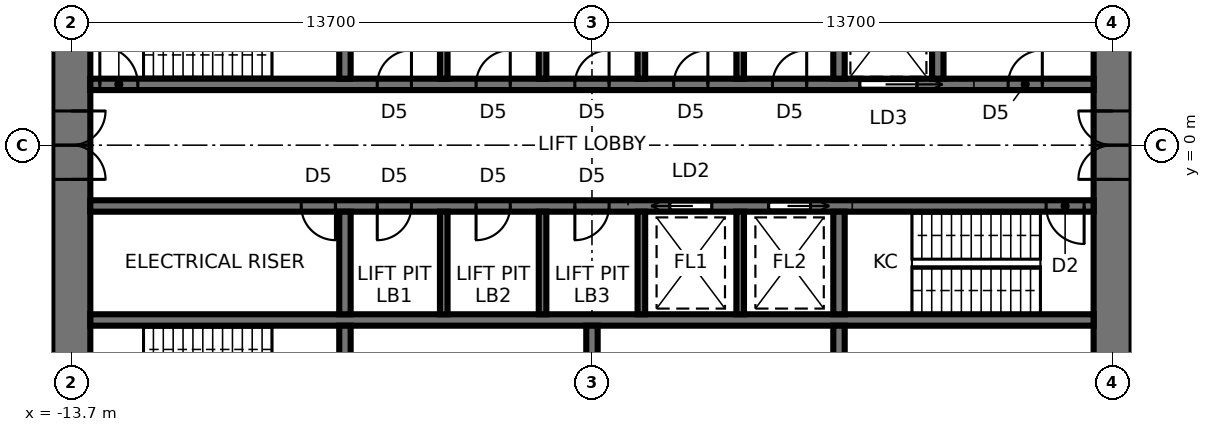
"""IFC4 building model, lengths in metres.
Left out: names, types, materials, properties, quantities, classifications, styles, units other than length and angle.
Written with IfcOpenShell. Run it as: python <this file> out.ifc"""

import sys

from ifc_helpers import new_model, si_unit, direction, frame, frame_2d, origin, place, context, subcontext, project, spatial, rectangle, extrude, element, fill, save


model = new_model("IFC4")
c1 = context("Model", 3, precision=1e-05, world=origin(), true_north=direction((0.0, 1.0)))
c2 = subcontext(c1, "Body", "Model", "MODEL_VIEW")
j1 = project(units=[si_unit("LENGTHUNIT", "METRE"), si_unit("PLANEANGLEUNIT", "RADIAN")], contexts=[c1])
p1 = place(None, origin())
s1 = spatial("IfcSite", under=j1, at=p1, CompositionType="ELEMENT")
p2 = place(p1, origin())
s2 = spatial("IfcBuilding", under=s1, at=p2, CompositionType="ELEMENT")
p3 = place(p2, frame((0.0, 0.0, -5.0)))
s3 = spatial("IfcBuildingStorey", under=s2, at=p3, CompositionType="ELEMENT", Elevation=-5.0)
p4 = place(p3, frame((13.7, -9.5, -0.15), z_axis=(0.0, 0.0, 1.0), x_axis=(0.0, 1.0, 0.0)))
e1 = element("IfcWall", 1, at=p4, inside=s3, PredefinedType="SHEAR", context=c2, shape_type="SweptSolid", body=[
    extrude(rectangle(XDim=19.0, YDim=1.0, at=frame_2d((9.5, 0.0))), origin(), (0.0, 0.0, 1.0), 5.15),
])
p5 = place(p4, frame((8.6, 0.0, 0.15)))
e2 = element("IfcOpeningElement", 2, at=p5, cuts=e1, PredefinedType="OPENING", context=c2, shape_type="SweptSolid", body=[
    extrude(rectangle(XDim=1.8, YDim=2.4, at=frame_2d((0.9, 1.2))), frame((0.0, 0.51, 0.0), z_axis=(0.0, -1.0, 0.0), x_axis=(1.0, 0.0, 0.0)), (0.0, 0.0, 1.0), 1.02),
])
p6 = place(p3, frame((-13.7, 9.5, -0.15), z_axis=(0.0, 0.0, 1.0), x_axis=(0.0, -1.0, 0.0)))
e3 = element("IfcWall", 3, at=p6, inside=s3, PredefinedType="SHEAR", context=c2, shape_type="SweptSolid", body=[
    extrude(rectangle(XDim=19.0, YDim=1.0, at=frame_2d((9.5, 0.0))), origin(), (0.0, 0.0, 1.0), 5.15),
])
p7 = place(p6, frame((8.6, 0.0, 0.15)))
e4 = element("IfcOpeningElement", 4, at=p7, cuts=e3, PredefinedType="OPENING", context=c2, shape_type="SweptSolid", body=[
    extrude(rectangle(XDim=1.8, YDim=2.4, at=frame_2d((0.9, 1.2))), frame((0.0, 0.51, 0.0), z_axis=(0.0, -1.0, 0.0), x_axis=(1.0, 0.0, 0.0)), (0.0, 0.0, 1.0), 1.02),
])
p8 = place(p3, frame((-13.2, 1.6, -0.15), z_axis=(0.0, 0.0, 1.0), x_axis=(1.0, 0.0, 0.0)))
e5 = element("IfcWall", 5, at=p8, inside=s3, PredefinedType="SHEAR", context=c2, shape_type="SweptSolid", body=[
    extrude(rectangle(XDim=26.4, YDim=0.3, at=frame_2d((13.2, 0.0))), origin(), (0.0, 0.0, 1.0), 5.15),
])
p9 = place(p8, frame((0.25, 0.0, 0.15)))
e6 = element("IfcOpeningElement", 6, at=p9, cuts=e5, PredefinedType="OPENING", context=c2, shape_type="SweptSolid", body=[
    extrude(rectangle(XDim=1.0, YDim=2.1, at=frame_2d((0.5, 1.05))), frame((0.0, 0.16, 0.0), z_axis=(0.0, -1.0, 0.0), x_axis=(1.0, 0.0, 0.0)), (0.0, 0.0, 1.0), 0.32),
])
p10 = place(p8, frame((20.25, 0.0, 0.15)))
e7 = element("IfcOpeningElement", 7, at=p10, cuts=e5, PredefinedType="OPENING", context=c2, shape_type="SweptSolid", body=[
    extrude(rectangle(XDim=1.5, YDim=2.4, at=frame_2d((0.75, 1.2))), frame((0.0, 0.16, 0.0), z_axis=(0.0, -1.0, 0.0), x_axis=(1.0, 0.0, 0.0)), (0.0, 0.0, 1.0), 0.32),
])
p11 = place(p8, frame((7.55, 0.0, 0.15)))
e8 = element("IfcOpeningElement", 8, at=p11, cuts=e5, PredefinedType="OPENING", context=c2, shape_type="SweptSolid", body=[
    extrude(rectangle(XDim=0.9, YDim=2.1, at=frame_2d((0.45, 1.05))), frame((0.0, 0.16, 0.0), z_axis=(0.0, -1.0, 0.0), x_axis=(1.0, 0.0, 0.0)), (0.0, 0.0, 1.0), 0.32),
])
p12 = place(p8, frame((10.15, 0.0, 0.15)))
e9 = element("IfcOpeningElement", 9, at=p12, cuts=e5, PredefinedType="OPENING", context=c2, shape_type="SweptSolid", body=[
    extrude(rectangle(XDim=0.9, YDim=2.1, at=frame_2d((0.45, 1.05))), frame((0.0, 0.16, 0.0), z_axis=(0.0, -1.0, 0.0), x_axis=(1.0, 0.0, 0.0)), (0.0, 0.0, 1.0), 0.32),
])
p13 = place(p8, frame((12.75, 0.0, 0.15)))
e10 = element("IfcOpeningElement", 10, at=p13, cuts=e5, PredefinedType="OPENING", context=c2, shape_type="SweptSolid", body=[
    extrude(rectangle(XDim=0.9, YDim=2.1, at=frame_2d((0.45, 1.05))), frame((0.0, 0.16, 0.0), z_axis=(0.0, -1.0, 0.0), x_axis=(1.0, 0.0, 0.0)), (0.0, 0.0, 1.0), 0.32),
])
p14 = place(p8, frame((15.35, 0.0, 0.15)))
e11 = element("IfcOpeningElement", 11, at=p14, cuts=e5, PredefinedType="OPENING", context=c2, shape_type="SweptSolid", body=[
    extrude(rectangle(XDim=0.9, YDim=2.1, at=frame_2d((0.45, 1.05))), frame((0.0, 0.16, 0.0), z_axis=(0.0, -1.0, 0.0), x_axis=(1.0, 0.0, 0.0)), (0.0, 0.0, 1.0), 0.32),
])
p15 = place(p8, frame((17.95, 0.0, 0.15)))
e12 = element("IfcOpeningElement", 12, at=p15, cuts=e5, PredefinedType="OPENING", context=c2, shape_type="SweptSolid", body=[
    extrude(rectangle(XDim=0.9, YDim=2.1, at=frame_2d((0.45, 1.05))), frame((0.0, 0.16, 0.0), z_axis=(0.0, -1.0, 0.0), x_axis=(1.0, 0.0, 0.0)), (0.0, 0.0, 1.0), 0.32),
])
p16 = place(p8, frame((24.15, 0.0, 0.15)))
e13 = element("IfcOpeningElement", 13, at=p16, cuts=e5, PredefinedType="OPENING", context=c2, shape_type="SweptSolid", body=[
    extrude(rectangle(XDim=0.9, YDim=2.1, at=frame_2d((0.45, 1.05))), frame((0.0, 0.16, 0.0), z_axis=(0.0, -1.0, 0.0), x_axis=(1.0, 0.0, 0.0)), (0.0, 0.0, 1.0), 0.32),
])
p17 = place(p3, frame((-13.2, -1.6, -0.15), z_axis=(0.0, 0.0, 1.0), x_axis=(1.0, 0.0, 0.0)))
e14 = element("IfcWall", 14, at=p17, inside=s3, PredefinedType="SHEAR", context=c2, shape_type="SweptSolid", body=[
    extrude(rectangle(XDim=26.4, YDim=0.3, at=frame_2d((13.2, 0.0))), origin(), (0.0, 0.0, 1.0), 5.15),
])
p18 = place(p17, frame((25.15, 0.0, 0.15)))
e15 = element("IfcOpeningElement", 15, at=p18, cuts=e14, PredefinedType="OPENING", context=c2, shape_type="SweptSolid", body=[
    extrude(rectangle(XDim=1.0, YDim=2.1, at=frame_2d((0.5, 1.05))), frame((0.0, 0.16, 0.0), z_axis=(0.0, -1.0, 0.0), x_axis=(1.0, 0.0, 0.0)), (0.0, 0.0, 1.0), 0.32),
])
p19 = place(p17, frame((7.55, 0.0, 0.15)))
e16 = element("IfcOpeningElement", 16, at=p19, cuts=e14, PredefinedType="OPENING", context=c2, shape_type="SweptSolid", body=[
    extrude(rectangle(XDim=0.9, YDim=2.1, at=frame_2d((0.45, 1.05))), frame((0.0, 0.16, 0.0), z_axis=(0.0, -1.0, 0.0), x_axis=(1.0, 0.0, 0.0)), (0.0, 0.0, 1.0), 0.32),
])
p20 = place(p17, frame((10.15, 0.0, 0.15)))
e17 = element("IfcOpeningElement", 17, at=p20, cuts=e14, PredefinedType="OPENING", context=c2, shape_type="SweptSolid", body=[
    extrude(rectangle(XDim=0.9, YDim=2.1, at=frame_2d((0.45, 1.05))), frame((0.0, 0.16, 0.0), z_axis=(0.0, -1.0, 0.0), x_axis=(1.0, 0.0, 0.0)), (0.0, 0.0, 1.0), 0.32),
])
p21 = place(p17, frame((12.75, 0.0, 0.15)))
e18 = element("IfcOpeningElement", 18, at=p21, cuts=e14, PredefinedType="OPENING", context=c2, shape_type="SweptSolid", body=[
    extrude(rectangle(XDim=0.9, YDim=2.1, at=frame_2d((0.45, 1.05))), frame((0.0, 0.16, 0.0), z_axis=(0.0, -1.0, 0.0), x_axis=(1.0, 0.0, 0.0)), (0.0, 0.0, 1.0), 0.32),
])
p22 = place(p17, frame((15.25, 0.0, 0.15)))
e19 = element("IfcOpeningElement", 19, at=p22, cuts=e14, PredefinedType="OPENING", context=c2, shape_type="SweptSolid", body=[
    extrude(rectangle(XDim=1.1, YDim=2.3, at=frame_2d((0.55, 1.15))), frame((0.0, 0.16, 0.0), z_axis=(0.0, -1.0, 0.0), x_axis=(1.0, 0.0, 0.0)), (0.0, 0.0, 1.0), 0.32),
])
p23 = place(p17, frame((17.85, 0.0, 0.15)))
e20 = element("IfcOpeningElement", 20, at=p23, cuts=e14, PredefinedType="OPENING", context=c2, shape_type="SweptSolid", body=[
    extrude(rectangle(XDim=1.1, YDim=2.3, at=frame_2d((0.55, 1.15))), frame((0.0, 0.16, 0.0), z_axis=(0.0, -1.0, 0.0), x_axis=(1.0, 0.0, 0.0)), (0.0, 0.0, 1.0), 0.32),
])
p24 = place(p17, frame((5.55, 0.0, 0.15)))
e21 = element("IfcOpeningElement", 21, at=p24, cuts=e14, PredefinedType="OPENING", context=c2, shape_type="SweptSolid", body=[
    extrude(rectangle(XDim=0.9, YDim=2.1, at=frame_2d((0.45, 1.05))), frame((0.0, 0.16, 0.0), z_axis=(0.0, -1.0, 0.0), x_axis=(1.0, 0.0, 0.0)), (0.0, 0.0, 1.0), 0.32),
])
p25 = place(p3, frame((-13.2, -4.6, -0.15), z_axis=(0.0, 0.0, 1.0), x_axis=(1.0, 0.0, 0.0)))
e22 = element("IfcWall", 22, at=p25, inside=s3, PredefinedType="SHEAR", context=c2, shape_type="SweptSolid", body=[
    extrude(rectangle(XDim=26.4, YDim=0.3, at=frame_2d((13.2, 0.0))), origin(), (0.0, 0.0, 1.0), 5.15),
])
for number, where, z_axis, x_axis in (
    (23, (-6.5, 1.75, -0.15), (0.0, 0.0, 1.0), (0.0, 1.0, 0.0)),
    (24, (6.5, 1.75, -0.15), (0.0, 0.0, 1.0), (0.0, 1.0, 0.0)),
):
    element("IfcWall", number, at=place(p3, frame(where, z_axis=z_axis, x_axis=x_axis)), inside=s3, PredefinedType="SHEAR", context=c2, shape_type="SweptSolid", body=[
        extrude(rectangle(XDim=2.7, YDim=0.3, at=frame_2d((1.35, 0.0))), origin(), (0.0, 0.0, 1.0), 5.15),
    ])
for number, where, z_axis, x_axis in (
    (25, (-3.9, 1.75, -0.15), (0.0, 0.0, 1.0), (0.0, 1.0, 0.0)),
    (26, (-1.3, 1.75, -0.15), (0.0, 0.0, 1.0), (0.0, 1.0, 0.0)),
    (27, (1.3, 1.75, -0.15), (0.0, 0.0, 1.0), (0.0, 1.0, 0.0)),
    (28, (3.9, 1.75, -0.15), (0.0, 0.0, 1.0), (0.0, 1.0, 0.0)),
):
    element("IfcWall", number, at=place(p3, frame(where, z_axis=z_axis, x_axis=x_axis)), inside=s3, PredefinedType="SHEAR", context=c2, shape_type="SweptSolid", body=[
        extrude(rectangle(XDim=2.7, YDim=0.2, at=frame_2d((1.35, 0.0))), origin(), (0.0, 0.0, 1.0), 5.15),
    ])
p26 = place(p3, frame((-6.5, -1.75, -0.15), z_axis=(0.0, 0.0, 1.0), x_axis=(0.0, -1.0, 0.0)))
e29 = element("IfcWall", 29, at=p26, inside=s3, PredefinedType="SHEAR", context=c2, shape_type="SweptSolid", body=[
    extrude(rectangle(XDim=2.7, YDim=0.3, at=frame_2d((1.35, 0.0))), origin(), (0.0, 0.0, 1.0), 5.15),
])
p27 = place(p3, frame((-6.5, -4.75, -0.15), z_axis=(0.0, 0.0, 1.0), x_axis=(0.0, -1.0, 0.0)))
e30 = element("IfcWall", 30, at=p27, inside=s3, PredefinedType="SHEAR", context=c2, shape_type="SweptSolid", body=[
    extrude(rectangle(XDim=3.75, YDim=0.3, at=frame_2d((1.875, 0.0))), origin(), (0.0, 0.0, 1.0), 5.15),
])
p28 = place(p3, frame((6.5, -1.75, -0.15), z_axis=(0.0, 0.0, 1.0), x_axis=(0.0, -1.0, 0.0)))
e31 = element("IfcWall", 31, at=p28, inside=s3, PredefinedType="SHEAR", context=c2, shape_type="SweptSolid", body=[
    extrude(rectangle(XDim=2.7, YDim=0.3, at=frame_2d((1.35, 0.0))), origin(), (0.0, 0.0, 1.0), 5.15),
])
p29 = place(p3, frame((6.5, -4.75, -0.15), z_axis=(0.0, 0.0, 1.0), x_axis=(0.0, -1.0, 0.0)))
e32 = element("IfcWall", 32, at=p29, inside=s3, PredefinedType="SHEAR", context=c2, shape_type="SweptSolid", body=[
    extrude(rectangle(XDim=3.75, YDim=0.3, at=frame_2d((1.875, 0.0))), origin(), (0.0, 0.0, 1.0), 5.15),
])
for number, where, z_axis, x_axis in (
    (33, (-3.9, -1.75, -0.15), (0.0, 0.0, 1.0), (0.0, -1.0, 0.0)),
    (34, (-1.3, -1.75, -0.15), (0.0, 0.0, 1.0), (0.0, -1.0, 0.0)),
    (35, (1.3, -1.75, -0.15), (0.0, 0.0, 1.0), (0.0, -1.0, 0.0)),
    (36, (3.9, -1.75, -0.15), (0.0, 0.0, 1.0), (0.0, -1.0, 0.0)),
):
    element("IfcWall", number, at=place(p3, frame(where, z_axis=z_axis, x_axis=x_axis)), inside=s3, PredefinedType="SHEAR", context=c2, shape_type="SweptSolid", body=[
        extrude(rectangle(XDim=2.7, YDim=0.2, at=frame_2d((1.35, 0.0))), origin(), (0.0, 0.0, 1.0), 5.15),
    ])
p30 = place(p3, frame((0.0, -4.75, -0.15), z_axis=(0.0, 0.0, 1.0), x_axis=(0.0, -1.0, 0.0)))
e37 = element("IfcWall", 37, at=p30, inside=s3, PredefinedType="SHEAR", context=c2, shape_type="SweptSolid", body=[
    extrude(rectangle(XDim=3.75, YDim=0.3, at=frame_2d((1.875, 0.0))), origin(), (0.0, 0.0, 1.0), 5.15),
])
p31 = place(p3, frame((9.1, 1.75, -0.15), z_axis=(0.0, 0.0, 1.0), x_axis=(0.0, 1.0, 0.0)))
e38 = element("IfcWall", 38, at=p31, inside=s3, PredefinedType="SHEAR", context=c2, shape_type="SweptSolid", body=[
    extrude(rectangle(XDim=2.7, YDim=0.3, at=frame_2d((1.35, 0.0))), origin(), (0.0, 0.0, 1.0), 5.15),
])
p32 = place(p7, origin())
e39 = element("IfcDoor", 39, at=p32, inside=s3, OperationType="DOUBLE_DOOR_SINGLE_SWING", PredefinedType="DOOR", context=c2, shape_type="SweptSolid", body=[
    extrude(rectangle(XDim=1.72, YDim=2.36, at=frame_2d((0.9, 1.18))), frame((0.0, 0.025, 0.0), z_axis=(0.0, -1.0, 0.0), x_axis=(1.0, 0.0, 0.0)), (0.0, 0.0, 1.0), 0.05),
    extrude(rectangle(XDim=0.04, YDim=2.4, at=frame_2d((0.02, 1.2))), frame((0.0, 0.25, 0.0), z_axis=(0.0, -1.0, 0.0), x_axis=(1.0, 0.0, 0.0)), (0.0, 0.0, 1.0), 0.5),
    extrude(rectangle(XDim=0.04, YDim=2.4, at=frame_2d((1.78, 1.2))), frame((0.0, 0.25, 0.0), z_axis=(0.0, -1.0, 0.0), x_axis=(1.0, 0.0, 0.0)), (0.0, 0.0, 1.0), 0.5),
    extrude(rectangle(XDim=1.72, YDim=0.04, at=frame_2d((0.9, 2.38))), frame((0.0, 0.25, 0.0), z_axis=(0.0, -1.0, 0.0), x_axis=(1.0, 0.0, 0.0)), (0.0, 0.0, 1.0), 0.5),
])
fill(e4, e39)
p33 = place(p5, origin())
e40 = element("IfcDoor", 40, at=p33, inside=s3, OperationType="DOUBLE_DOOR_SINGLE_SWING", PredefinedType="DOOR", context=c2, shape_type="SweptSolid", body=[
    extrude(rectangle(XDim=1.72, YDim=2.36, at=frame_2d((0.9, 1.18))), frame((0.0, 0.025, 0.0), z_axis=(0.0, -1.0, 0.0), x_axis=(1.0, 0.0, 0.0)), (0.0, 0.0, 1.0), 0.05),
    extrude(rectangle(XDim=0.04, YDim=2.4, at=frame_2d((0.02, 1.2))), frame((0.0, 0.25, 0.0), z_axis=(0.0, -1.0, 0.0), x_axis=(1.0, 0.0, 0.0)), (0.0, 0.0, 1.0), 0.5),
    extrude(rectangle(XDim=0.04, YDim=2.4, at=frame_2d((1.78, 1.2))), frame((0.0, 0.25, 0.0), z_axis=(0.0, -1.0, 0.0), x_axis=(1.0, 0.0, 0.0)), (0.0, 0.0, 1.0), 0.5),
    extrude(rectangle(XDim=1.72, YDim=0.04, at=frame_2d((0.9, 2.38))), frame((0.0, 0.25, 0.0), z_axis=(0.0, -1.0, 0.0), x_axis=(1.0, 0.0, 0.0)), (0.0, 0.0, 1.0), 0.5),
])
fill(e2, e40)
p34 = place(p9, origin())
e41 = element("IfcDoor", 41, at=p34, inside=s3, OperationType="SINGLE_SWING_LEFT", PredefinedType="DOOR", context=c2, shape_type="SweptSolid", body=[
    extrude(rectangle(XDim=1.0, YDim=2.1, at=frame_2d((0.5, 1.05))), frame((0.0, 0.025, 0.0), z_axis=(0.0, -1.0, 0.0), x_axis=(1.0, 0.0, 0.0)), (0.0, 0.0, 1.0), 0.05),
])
fill(e6, e41)
p35 = place(p18, frame((1.0, 0.0, 0.0), z_axis=(0.0, 0.0, 1.0), x_axis=(-1.0, 0.0, 0.0)))
e42 = element("IfcDoor", 42, at=p35, inside=s3, OperationType="SINGLE_SWING_LEFT", PredefinedType="DOOR", context=c2, shape_type="SweptSolid", body=[
    extrude(rectangle(XDim=1.0, YDim=2.1, at=frame_2d((0.5, 1.05))), frame((0.0, 0.025, 0.0), z_axis=(0.0, -1.0, 0.0), x_axis=(1.0, 0.0, 0.0)), (0.0, 0.0, 1.0), 0.05),
])
fill(e15, e42)
p36 = place(p10, origin())
e43 = element("IfcDoor", 43, at=p36, inside=s3, OperationType="SLIDING_TO_RIGHT", PredefinedType="DOOR", context=c2, shape_type="SweptSolid", body=[
    extrude(rectangle(XDim=1.5, YDim=2.4, at=frame_2d((0.75, 1.2))), frame((0.0, 0.025, 0.0), z_axis=(0.0, -1.0, 0.0), x_axis=(1.0, 0.0, 0.0)), (0.0, 0.0, 1.0), 0.05),
])
fill(e7, e43)
p37 = place(p11, origin())
e44 = element("IfcDoor", 44, at=p37, inside=s3, OperationType="SINGLE_SWING_RIGHT", PredefinedType="DOOR", context=c2, shape_type="SweptSolid", body=[
    extrude(rectangle(XDim=0.9, YDim=2.1, at=frame_2d((0.45, 1.05))), frame((0.0, 0.025, 0.0), z_axis=(0.0, -1.0, 0.0), x_axis=(1.0, 0.0, 0.0)), (0.0, 0.0, 1.0), 0.05),
])
fill(e8, e44)
p38 = place(p12, origin())
e45 = element("IfcDoor", 45, at=p38, inside=s3, OperationType="SINGLE_SWING_RIGHT", PredefinedType="DOOR", context=c2, shape_type="SweptSolid", body=[
    extrude(rectangle(XDim=0.9, YDim=2.1, at=frame_2d((0.45, 1.05))), frame((0.0, 0.025, 0.0), z_axis=(0.0, -1.0, 0.0), x_axis=(1.0, 0.0, 0.0)), (0.0, 0.0, 1.0), 0.05),
])
fill(e9, e45)
p39 = place(p13, origin())
e46 = element("IfcDoor", 46, at=p39, inside=s3, OperationType="SINGLE_SWING_RIGHT", PredefinedType="DOOR", context=c2, shape_type="SweptSolid", body=[
    extrude(rectangle(XDim=0.9, YDim=2.1, at=frame_2d((0.45, 1.05))), frame((0.0, 0.025, 0.0), z_axis=(0.0, -1.0, 0.0), x_axis=(1.0, 0.0, 0.0)), (0.0, 0.0, 1.0), 0.05),
])
fill(e10, e46)
p40 = place(p14, origin())
e47 = element("IfcDoor", 47, at=p40, inside=s3, OperationType="SINGLE_SWING_RIGHT", PredefinedType="DOOR", context=c2, shape_type="SweptSolid", body=[
    extrude(rectangle(XDim=0.9, YDim=2.1, at=frame_2d((0.45, 1.05))), frame((0.0, 0.025, 0.0), z_axis=(0.0, -1.0, 0.0), x_axis=(1.0, 0.0, 0.0)), (0.0, 0.0, 1.0), 0.05),
])
fill(e11, e47)
p41 = place(p15, origin())
e48 = element("IfcDoor", 48, at=p41, inside=s3, OperationType="SINGLE_SWING_RIGHT", PredefinedType="DOOR", context=c2, shape_type="SweptSolid", body=[
    extrude(rectangle(XDim=0.9, YDim=2.1, at=frame_2d((0.45, 1.05))), frame((0.0, 0.025, 0.0), z_axis=(0.0, -1.0, 0.0), x_axis=(1.0, 0.0, 0.0)), (0.0, 0.0, 1.0), 0.05),
])
fill(e12, e48)
p42 = place(p19, frame((0.9, 0.0, 0.0), z_axis=(0.0, 0.0, 1.0), x_axis=(-1.0, 0.0, 0.0)))
e49 = element("IfcDoor", 49, at=p42, inside=s3, OperationType="SINGLE_SWING_RIGHT", PredefinedType="DOOR", context=c2, shape_type="SweptSolid", body=[
    extrude(rectangle(XDim=0.9, YDim=2.1, at=frame_2d((0.45, 1.05))), frame((0.0, 0.025, 0.0), z_axis=(0.0, -1.0, 0.0), x_axis=(1.0, 0.0, 0.0)), (0.0, 0.0, 1.0), 0.05),
])
fill(e16, e49)
p43 = place(p20, frame((0.9, 0.0, 0.0), z_axis=(0.0, 0.0, 1.0), x_axis=(-1.0, 0.0, 0.0)))
e50 = element("IfcDoor", 50, at=p43, inside=s3, OperationType="SINGLE_SWING_RIGHT", PredefinedType="DOOR", context=c2, shape_type="SweptSolid", body=[
    extrude(rectangle(XDim=0.9, YDim=2.1, at=frame_2d((0.45, 1.05))), frame((0.0, 0.025, 0.0), z_axis=(0.0, -1.0, 0.0), x_axis=(1.0, 0.0, 0.0)), (0.0, 0.0, 1.0), 0.05),
])
fill(e17, e50)
p44 = place(p21, frame((0.9, 0.0, 0.0), z_axis=(0.0, 0.0, 1.0), x_axis=(-1.0, 0.0, 0.0)))
e51 = element("IfcDoor", 51, at=p44, inside=s3, OperationType="SINGLE_SWING_RIGHT", PredefinedType="DOOR", context=c2, shape_type="SweptSolid", body=[
    extrude(rectangle(XDim=0.9, YDim=2.1, at=frame_2d((0.45, 1.05))), frame((0.0, 0.025, 0.0), z_axis=(0.0, -1.0, 0.0), x_axis=(1.0, 0.0, 0.0)), (0.0, 0.0, 1.0), 0.05),
])
fill(e18, e51)
p45 = place(p22, frame((1.1, 0.0, 0.0), z_axis=(0.0, 0.0, 1.0), x_axis=(-1.0, 0.0, 0.0)))
e52 = element("IfcDoor", 52, at=p45, inside=s3, OperationType="SLIDING_TO_RIGHT", PredefinedType="DOOR", context=c2, shape_type="SweptSolid", body=[
    extrude(rectangle(XDim=1.1, YDim=2.3, at=frame_2d((0.55, 1.15))), frame((0.0, 0.025, 0.0), z_axis=(0.0, -1.0, 0.0), x_axis=(1.0, 0.0, 0.0)), (0.0, 0.0, 1.0), 0.05),
])
fill(e19, e52)
p46 = place(p23, frame((1.1, 0.0, 0.0), z_axis=(0.0, 0.0, 1.0), x_axis=(-1.0, 0.0, 0.0)))
e53 = element("IfcDoor", 53, at=p46, inside=s3, OperationType="SLIDING_TO_LEFT", PredefinedType="DOOR", context=c2, shape_type="SweptSolid", body=[
    extrude(rectangle(XDim=1.1, YDim=2.3, at=frame_2d((0.55, 1.15))), frame((0.0, 0.025, 0.0), z_axis=(0.0, -1.0, 0.0), x_axis=(1.0, 0.0, 0.0)), (0.0, 0.0, 1.0), 0.05),
])
fill(e20, e53)
p47 = place(p16, origin())
e54 = element("IfcDoor", 54, at=p47, inside=s3, OperationType="SINGLE_SWING_RIGHT", PredefinedType="DOOR", context=c2, shape_type="SweptSolid", body=[
    extrude(rectangle(XDim=0.9, YDim=2.1, at=frame_2d((0.45, 1.05))), frame((0.0, 0.025, 0.0), z_axis=(0.0, -1.0, 0.0), x_axis=(1.0, 0.0, 0.0)), (0.0, 0.0, 1.0), 0.05),
])
fill(e13, e54)
p48 = place(p24, frame((0.9, 0.0, 0.0), z_axis=(0.0, 0.0, 1.0), x_axis=(-1.0, 0.0, 0.0)))
e55 = element("IfcDoor", 55, at=p48, inside=s3, OperationType="SINGLE_SWING_LEFT", PredefinedType="DOOR", context=c2, shape_type="SweptSolid", body=[
    extrude(rectangle(XDim=0.9, YDim=2.1, at=frame_2d((0.45, 1.05))), frame((0.0, 0.025, 0.0), z_axis=(0.0, -1.0, 0.0), x_axis=(1.0, 0.0, 0.0)), (0.0, 0.0, 1.0), 0.05),
])
fill(e21, e55)
save(model, sys.argv[1])
